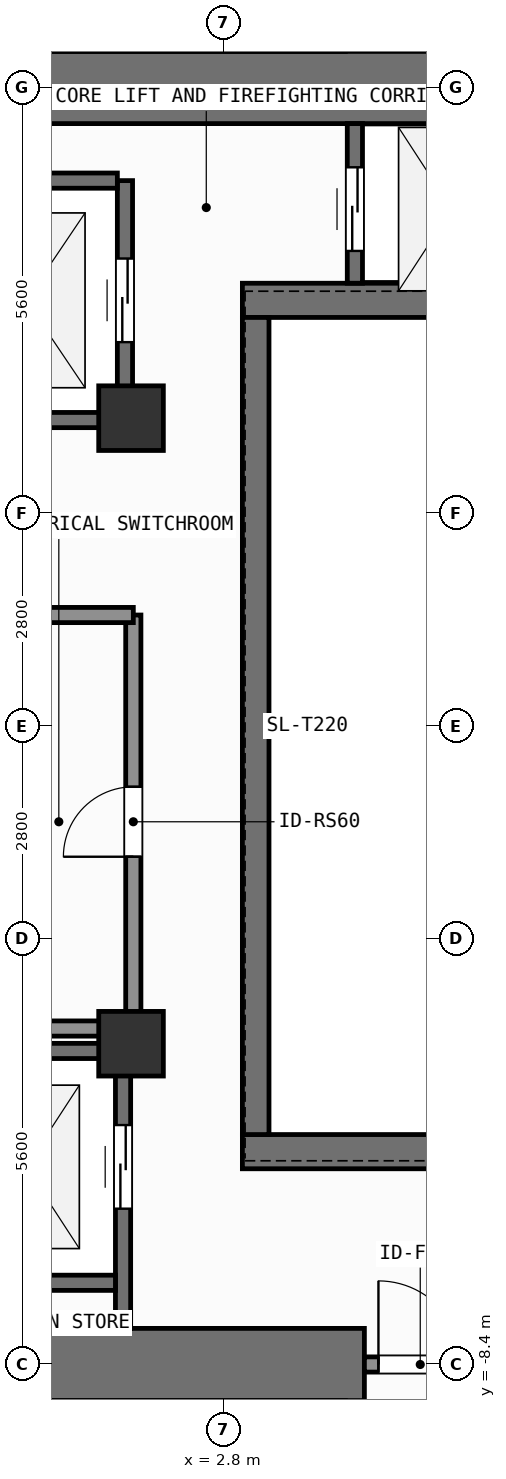
"""IFC4 building model, lengths in metres.
Left out: names, types, materials, properties, quantities, classifications, styles, units other than length and angle.
Written with IfcOpenShell. Run it as: python <this file> out.ifc"""

import sys

from ifc_helpers import new_model, si_unit, direction, frame, frame_2d, origin, origin_2d, place, context, subcontext, project, spatial, rectangle, extrude, element, fill, save


model = new_model("IFC4")
c1 = context("Model", 3, precision=1e-05, world=origin(), true_north=direction((0.0, 1.0)))
c2 = subcontext(c1, "Body", "Model", "MODEL_VIEW")
j1 = project(units=[si_unit("LENGTHUNIT", "METRE"), si_unit("PLANEANGLEUNIT", "RADIAN")], contexts=[c1])
p1 = place(None, origin())
s1 = spatial("IfcSite", under=j1, at=p1, CompositionType="ELEMENT")
p2 = place(p1, origin())
s2 = spatial("IfcBuilding", under=s1, at=p2, CompositionType="ELEMENT")
p3 = place(p2, frame((0.0, 0.0, 144.6)))
s3 = spatial("IfcBuildingStorey", under=s2, at=p3, CompositionType="ELEMENT", Elevation=144.6)
p4 = place(p3, frame((-2.62, -8.4, 0.0), z_axis=(0.0, 0.0, 1.0), x_axis=(1.0, 0.0, 0.0)))
e1 = element("IfcWall", 1, at=p4, inside=s3, PredefinedType="SHEAR", context=c2, shape_type="SweptSolid", body=[
    extrude(rectangle(XDim=7.27, YDim=0.95, at=frame_2d((3.635, 0.0))), origin(), (0.0, 0.0, 1.0), 3.9),
])
p5 = place(p3, frame((-7.55, 8.4, 0.0), z_axis=(0.0, 0.0, 1.0), x_axis=(1.0, 0.0, 0.0)))
e2 = element("IfcWall", 2, at=p5, inside=s3, PredefinedType="SHEAR", context=c2, shape_type="SweptSolid", body=[
    extrude(rectangle(XDim=16.425, YDim=0.95, at=frame_2d((8.212, 0.0))), origin(), (0.0, 0.0, 1.0), 3.9),
])
for number, where, z_axis, x_axis in (
    (3, (3.045, -5.6, 0.0), (0.0, 0.0, 1.0), (1.0, 0.0, 0.0)),
    (4, (3.045, 5.6, 0.0), (0.0, 0.0, 1.0), (1.0, 0.0, 0.0)),
):
    element("IfcWall", number, at=place(p3, frame(where, z_axis=z_axis, x_axis=x_axis)), inside=s3, PredefinedType="SHEAR", context=c2, shape_type="SweptSolid", body=[
        extrude(rectangle(XDim=5.83, YDim=0.45, at=frame_2d((2.915, 0.0))), origin(), (0.0, 0.0, 1.0), 3.9),
    ])
p6 = place(p3, frame((3.22, -5.375, 0.0), z_axis=(0.0, 0.0, 1.0), x_axis=(0.0, 1.0, 0.0)))
e5 = element("IfcWall", 5, at=p6, inside=s3, PredefinedType="SHEAR", context=c2, shape_type="SweptSolid", body=[
    extrude(rectangle(XDim=10.75, YDim=0.35, at=frame_2d((5.375, 0.0))), origin(), (0.0, 0.0, 1.0), 3.9),
])
for number, where, z_axis, x_axis in (
    (6, (1.58, -4.18, 0.0), (0.0, 0.0, 1.0), (1.0, 0.0, 0.0)),
    (7, (1.58, 4.05, 0.0), (0.0, 0.0, 1.0), (1.0, 0.0, 0.0)),
):
    element("IfcColumn", number, at=place(p3, frame(where, z_axis=z_axis, x_axis=x_axis)), inside=s3, PredefinedType="COLUMN", context=c2, shape_type="SweptSolid", body=[
        extrude(rectangle(XDim=0.85, YDim=0.85, at=origin_2d()), origin(), (0.0, 0.0, 1.0), 3.9),
    ])
p7 = place(p3, frame((1.5, 4.025, 0.0), z_axis=(0.0, 0.0, 1.0), x_axis=(0.0, 1.0, 0.0)))
e8 = element("IfcWall", 8, at=p7, inside=s3, PredefinedType="SHEAR", context=c2, shape_type="SweptSolid", body=[
    extrude(rectangle(XDim=3.15, YDim=0.2, at=frame_2d((1.575, 0.0))), origin(), (0.0, 0.0, 1.0), 3.68),
])
p8 = place(p7, frame((1.025, 0.0, 0.0)))
e9 = element("IfcOpeningElement", 9, at=p8, cuts=e8, PredefinedType="OPENING", context=c2, shape_type="SweptSolid", body=[
    extrude(rectangle(XDim=1.1, YDim=2.2, at=frame_2d((0.55, 1.1))), frame((0.0, 0.11, 0.0), z_axis=(0.0, -1.0, 0.0), x_axis=(1.0, 0.0, 0.0)), (0.0, 0.0, 1.0), 0.22),
])
for number, where, z_axis, x_axis in (
    (10, (-1.0, 4.025, 0.0), (0.0, 0.0, 1.0), (1.0, 0.0, 0.0)),
    (11, (-1.0, 7.175, 0.0), (0.0, 0.0, 1.0), (1.0, 0.0, 0.0)),
):
    element("IfcWall", number, at=place(p3, frame(where, z_axis=z_axis, x_axis=x_axis)), inside=s3, PredefinedType="SHEAR", context=c2, shape_type="SweptSolid", body=[
        extrude(rectangle(XDim=2.4, YDim=0.2, at=frame_2d((1.2, 0.0))), origin(), (0.0, 0.0, 1.0), 3.68),
    ])
p9 = place(p3, frame((1.475, -7.925, 0.0), z_axis=(0.0, 0.0, 1.0), x_axis=(0.0, 1.0, 0.0)))
e12 = element("IfcWall", 12, at=p9, inside=s3, PredefinedType="SHEAR", context=c2, shape_type="SweptSolid", body=[
    extrude(rectangle(XDim=3.65, YDim=0.2, at=frame_2d((1.825, 0.0))), origin(), (0.0, 0.0, 1.0), 3.68),
])
p10 = place(p9, frame((1.575, 0.0, 0.0)))
e13 = element("IfcOpeningElement", 13, at=p10, cuts=e12, PredefinedType="OPENING", context=c2, shape_type="SweptSolid", body=[
    extrude(rectangle(XDim=1.1, YDim=2.2, at=frame_2d((0.55, 1.1))), frame((0.0, 0.11, 0.0), z_axis=(0.0, -1.0, 0.0), x_axis=(1.0, 0.0, 0.0)), (0.0, 0.0, 1.0), 0.22),
])
for number, where, z_axis, x_axis in (
    (14, (-0.975, -7.325, 0.0), (0.0, 0.0, 1.0), (1.0, 0.0, 0.0)),
    (15, (-0.975, -4.275, 0.0), (0.0, 0.0, 1.0), (1.0, 0.0, 0.0)),
):
    element("IfcWall", number, at=place(p3, frame(where, z_axis=z_axis, x_axis=x_axis)), inside=s3, PredefinedType="SHEAR", context=c2, shape_type="SweptSolid", body=[
        extrude(rectangle(XDim=2.35, YDim=0.2, at=frame_2d((1.175, 0.0))), origin(), (0.0, 0.0, 1.0), 3.68),
    ])
p11 = place(p3, frame((4.525, 5.825, 0.0), z_axis=(0.0, 0.0, 1.0), x_axis=(0.0, 1.0, 0.0)))
e16 = element("IfcWall", 16, at=p11, inside=s3, PredefinedType="SHEAR", context=c2, shape_type="SweptSolid", body=[
    extrude(rectangle(XDim=2.1, YDim=0.2, at=frame_2d((1.05, 0.0))), origin(), (0.0, 0.0, 1.0), 3.68),
])
p12 = place(p11, frame((0.425, 0.0, 0.0)))
e17 = element("IfcOpeningElement", 17, at=p12, cuts=e16, PredefinedType="OPENING", context=c2, shape_type="SweptSolid", body=[
    extrude(rectangle(XDim=1.1, YDim=2.2, at=frame_2d((0.55, 1.1))), frame((0.0, 0.11, 0.0), z_axis=(0.0, -1.0, 0.0), x_axis=(1.0, 0.0, 0.0)), (0.0, 0.0, 1.0), 0.22),
])
p13 = place(p3, frame((4.65, -8.4, 0.0), z_axis=(0.0, 0.0, 1.0), x_axis=(1.0, 0.0, 0.0)))
e18 = element("IfcWall", 18, at=p13, inside=s3, PredefinedType="SOLIDWALL", context=c2, shape_type="SweptSolid", body=[
    extrude(rectangle(XDim=1.47, YDim=0.2, at=frame_2d((0.735, 0.0))), origin(), (0.0, 0.0, 1.0), 2.72),
])
p14 = place(p13, frame((0.185, 0.0, 0.0)))
e19 = element("IfcOpeningElement", 19, at=p14, cuts=e18, PredefinedType="OPENING", context=c2, shape_type="SweptSolid", body=[
    extrude(rectangle(XDim=1.1, YDim=2.15, at=frame_2d((0.55, 1.075))), frame((0.0, 0.11, 0.0), z_axis=(0.0, -1.0, 0.0), x_axis=(1.0, 0.0, 0.0)), (0.0, 0.0, 1.0), 0.22),
])
p15 = place(p3, frame((1.61, -3.98, 0.0), z_axis=(0.0, 0.0, 1.0), x_axis=(0.0, 1.0, 0.0)))
e20 = element("IfcWall", 20, at=p15, inside=s3, PredefinedType="SOLIDWALL", context=c2, shape_type="SweptSolid", body=[
    extrude(rectangle(XDim=5.44, YDim=0.2, at=frame_2d((2.72, 0.0))), origin(), (0.0, 0.0, 1.0), 3.68),
])
p16 = place(p15, frame((2.26, 0.0, 0.0)))
e21 = element("IfcOpeningElement", 21, at=p16, cuts=e20, PredefinedType="OPENING", context=c2, shape_type="SweptSolid", body=[
    extrude(rectangle(XDim=0.92, YDim=2.1, at=frame_2d((0.46, 1.05))), frame((0.0, 0.11, 0.0), z_axis=(0.0, -1.0, 0.0), x_axis=(1.0, 0.0, 0.0)), (0.0, 0.0, 1.0), 0.22),
])
for number, where, z_axis, x_axis in (
    (22, (-1.58, -3.98, 0.0), (0.0, 0.0, 1.0), (1.0, 0.0, 0.0)),
    (23, (-1.58, 1.46, 0.0), (0.0, 0.0, 1.0), (1.0, 0.0, 0.0)),
):
    element("IfcWall", number, at=place(p3, frame(where, z_axis=z_axis, x_axis=x_axis)), inside=s3, PredefinedType="SOLIDWALL", context=c2, shape_type="SweptSolid", body=[
        extrude(rectangle(XDim=3.19, YDim=0.2, at=frame_2d((1.595, 0.0))), origin(), (0.0, 0.0, 1.0), 3.68),
    ])
p17 = place(p8, origin())
e24 = element("IfcDoor", 24, at=p17, inside=s3, OperationType="SLIDING_TO_LEFT", PredefinedType="DOOR", context=c2, shape_type="SweptSolid", body=[
    extrude(rectangle(XDim=1.1, YDim=2.2, at=frame_2d((0.55, 1.1))), frame((0.0, 0.025, 0.0), z_axis=(0.0, -1.0, 0.0), x_axis=(1.0, 0.0, 0.0)), (0.0, 0.0, 1.0), 0.05),
])
fill(e9, e24)
p18 = place(p10, origin())
e25 = element("IfcDoor", 25, at=p18, inside=s3, OperationType="SLIDING_TO_LEFT", PredefinedType="DOOR", context=c2, shape_type="SweptSolid", body=[
    extrude(rectangle(XDim=1.1, YDim=2.2, at=frame_2d((0.55, 1.1))), frame((0.0, 0.025, 0.0), z_axis=(0.0, -1.0, 0.0), x_axis=(1.0, 0.0, 0.0)), (0.0, 0.0, 1.0), 0.05),
])
fill(e13, e25)
p19 = place(p12, origin())
e26 = element("IfcDoor", 26, at=p19, inside=s3, OperationType="SLIDING_TO_LEFT", PredefinedType="DOOR", context=c2, shape_type="SweptSolid", body=[
    extrude(rectangle(XDim=1.1, YDim=2.2, at=frame_2d((0.55, 1.1))), frame((0.0, 0.025, 0.0), z_axis=(0.0, -1.0, 0.0), x_axis=(1.0, 0.0, 0.0)), (0.0, 0.0, 1.0), 0.05),
])
fill(e17, e26)
p20 = place(p14, origin())
e27 = element("IfcDoor", 27, at=p20, inside=s3, OperationType="SINGLE_SWING_LEFT", PredefinedType="DOOR", context=c2, shape_type="SweptSolid", body=[
    extrude(rectangle(XDim=1.1, YDim=2.15, at=frame_2d((0.55, 1.075))), frame((0.0, 0.025, 0.0), z_axis=(0.0, -1.0, 0.0), x_axis=(1.0, 0.0, 0.0)), (0.0, 0.0, 1.0), 0.05),
])
fill(e19, e27)
p21 = place(p16, origin())
e28 = element("IfcDoor", 28, at=p21, inside=s3, OperationType="SINGLE_SWING_LEFT", PredefinedType="DOOR", context=c2, shape_type="SweptSolid", body=[
    extrude(rectangle(XDim=0.92, YDim=2.1, at=frame_2d((0.46, 1.05))), frame((0.0, 0.025, 0.0), z_axis=(0.0, -1.0, 0.0), x_axis=(1.0, 0.0, 0.0)), (0.0, 0.0, 1.0), 0.05),
])
fill(e21, e28)
save(model, sys.argv[1])
